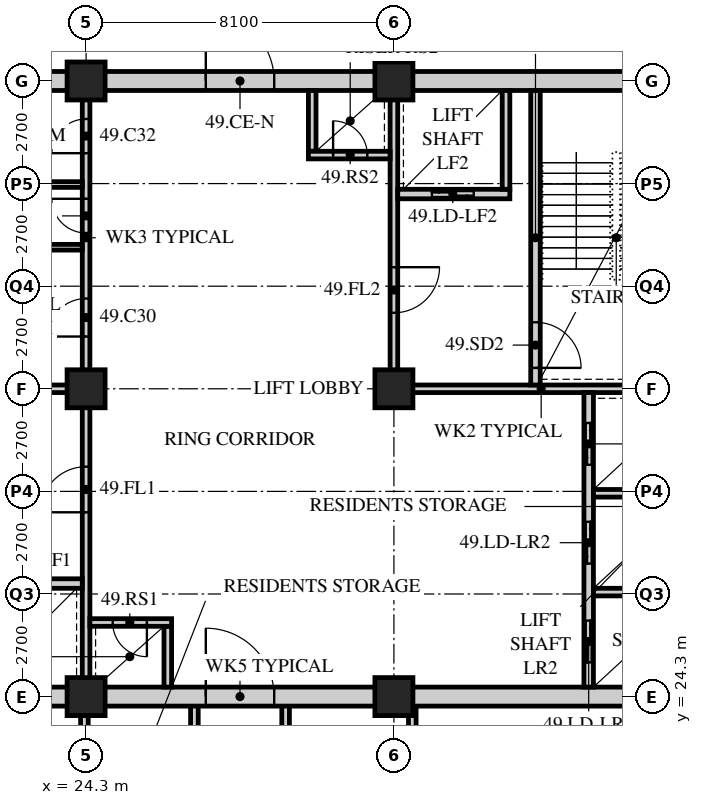
"""IFC4 building model, lengths in metres.
Left out: names, types, materials, properties, quantities, classifications, styles, units other than length and angle.
Written with IfcOpenShell. Run it as: python <this file> out.ifc"""

import sys

from ifc_helpers import new_model, si_unit, direction, frame, frame_2d, origin, origin_2d, place, context, subcontext, project, spatial, rectangle, hollow_rectangle, extrude, element, fill, save


model = new_model("IFC4")
c1 = context("Model", 3, precision=1e-05, world=origin(), true_north=direction((0.0, 1.0)))
c2 = subcontext(c1, "Body", "Model", "MODEL_VIEW")
j1 = project(units=[si_unit("LENGTHUNIT", "METRE"), si_unit("PLANEANGLEUNIT", "RADIAN")], contexts=[c1])
p1 = place(None, origin())
s1 = spatial("IfcSite", under=j1, at=p1, CompositionType="ELEMENT")
p2 = place(p1, origin())
s2 = spatial("IfcBuilding", under=s1, at=p2, CompositionType="ELEMENT")
p3 = place(p2, frame((0.0, 0.0, 192.0)))
s3 = spatial("IfcBuildingStorey", under=s2, at=p3, CompositionType="ELEMENT", Elevation=192.0)
for number, where, z_axis, x_axis in (
    (1, (24.3, 24.3, 0.0), (0.0, 0.0, 1.0), (1.0, 0.0, 0.0)),
    (2, (24.3, 32.4, 0.0), (0.0, 0.0, 1.0), (1.0, 0.0, 0.0)),
    (3, (24.3, 40.5, 0.0), (0.0, 0.0, 1.0), (1.0, 0.0, 0.0)),
    (4, (32.4, 24.3, 0.0), (0.0, 0.0, 1.0), (1.0, 0.0, 0.0)),
    (5, (32.4, 32.4, 0.0), (0.0, 0.0, 1.0), (1.0, 0.0, 0.0)),
    (6, (32.4, 40.5, 0.0), (0.0, 0.0, 1.0), (1.0, 0.0, 0.0)),
):
    element("IfcColumn", number, at=place(p3, frame(where, z_axis=z_axis, x_axis=x_axis)), inside=s3, PredefinedType="COLUMN", context=c2, shape_type="SweptSolid", body=[
        extrude(hollow_rectangle(XDim=1.0, YDim=1.0, WallThickness=0.1, at=origin_2d()), origin(), (0.0, 0.0, 1.0), 3.6),
    ])
p4 = place(p3, frame((24.256, 20.7, 0.0), z_axis=(0.0, 0.0, 1.0), x_axis=(0.0, 1.0, 0.0)))
e7 = element("IfcWall", 7, at=p4, inside=s3, PredefinedType="SOLIDWALL", context=c2, shape_type="SweptSolid", body=[
    extrude(rectangle(XDim=3.6, YDim=0.2, at=frame_2d((1.8, 0.0))), origin(), (0.0, 0.0, 1.0), 2.778),
])
for number, where, z_axis, x_axis in (
    (8, (32.883, 20.7, 0.0), (0.0, 0.0, 1.0), (0.0, 1.0, 0.0)),
    (9, (27.15, 20.7, 0.0), (0.0, 0.0, 1.0), (0.0, 1.0, 0.0)),
    (10, (29.55, 20.7, 0.0), (0.0, 0.0, 1.0), (0.0, 1.0, 0.0)),
):
    element("IfcWall", number, at=place(p3, frame(where, z_axis=z_axis, x_axis=x_axis)), inside=s3, PredefinedType="SOLIDWALL", context=c2, shape_type="SweptSolid", body=[
        extrude(rectangle(XDim=3.6, YDim=0.2, at=frame_2d((1.8, 0.0))), origin(), (0.0, 0.0, 1.0), 3.39),
    ])
p5 = place(p3, frame((15.95, 24.3, 0.0), z_axis=(0.0, 0.0, 1.0), x_axis=(1.0, 0.0, 0.0)))
e11 = element("IfcWall", 11, at=p5, inside=s3, PredefinedType="SOLIDWALL", context=c2, shape_type="SweptSolid", body=[
    extrude(rectangle(XDim=24.8, YDim=0.5, at=frame_2d((12.4, 0.0))), origin(), (0.0, 0.0, 1.0), 2.74),
])
p6 = place(p5, frame((11.5, 0.0, 0.0)))
e12 = element("IfcOpeningElement", 12, at=p6, cuts=e11, PredefinedType="OPENING", context=c2, shape_type="SweptSolid", body=[
    extrude(rectangle(XDim=1.8, YDim=2.4, at=frame_2d((0.9, 1.2))), frame((0.0, 0.26, 0.0), z_axis=(0.0, -1.0, 0.0), x_axis=(1.0, 0.0, 0.0)), (0.0, 0.0, 1.0), 0.52),
])
p7 = place(p3, frame((15.95, 40.5, 0.0), z_axis=(0.0, 0.0, 1.0), x_axis=(1.0, 0.0, 0.0)))
e13 = element("IfcWall", 13, at=p7, inside=s3, PredefinedType="SOLIDWALL", context=c2, shape_type="SweptSolid", body=[
    extrude(rectangle(XDim=24.8, YDim=0.5, at=frame_2d((12.4, 0.0))), origin(), (0.0, 0.0, 1.0), 2.74),
])
p8 = place(p7, frame((11.5, 0.0, 0.0)))
e14 = element("IfcOpeningElement", 14, at=p8, cuts=e13, PredefinedType="OPENING", context=c2, shape_type="SweptSolid", body=[
    extrude(rectangle(XDim=1.8, YDim=2.4, at=frame_2d((0.9, 1.2))), frame((0.0, 0.26, 0.0), z_axis=(0.0, -1.0, 0.0), x_axis=(1.0, 0.0, 0.0)), (0.0, 0.0, 1.0), 0.52),
])
p9 = place(p3, frame((16.45, 32.4, 0.0), z_axis=(0.0, 0.0, 1.0), x_axis=(1.0, 0.0, 0.0)))
e15 = element("IfcWall", 15, at=p9, inside=s3, PredefinedType="SOLIDWALL", context=c2, shape_type="SweptSolid", body=[
    extrude(rectangle(XDim=7.95, YDim=0.2, at=frame_2d((3.975, 0.0))), origin(), (0.0, 0.0, 1.0), 2.778),
])
p10 = place(p3, frame((24.3, 24.55, 0.0), z_axis=(0.0, 0.0, 1.0), x_axis=(0.0, 1.0, 0.0)))
e16 = element("IfcWall", 16, at=p10, inside=s3, PredefinedType="SOLIDWALL", context=c2, shape_type="SweptSolid", body=[
    extrude(rectangle(XDim=7.75, YDim=0.2, at=frame_2d((3.875, 0.0))), origin(), (0.0, 0.0, 1.0), 2.778),
])
p11 = place(p10, frame((4.6, 0.0, 0.0)))
e17 = element("IfcOpeningElement", 17, at=p11, cuts=e16, PredefinedType="OPENING", context=c2, shape_type="SweptSolid", body=[
    extrude(rectangle(XDim=1.2, YDim=2.1, at=frame_2d((0.6, 1.05))), frame((0.0, 0.11, 0.0), z_axis=(0.0, -1.0, 0.0), x_axis=(1.0, 0.0, 0.0)), (0.0, 0.0, 1.0), 0.22),
])
p12 = place(p3, frame((21.25, 27.275, 0.0), z_axis=(0.0, 0.0, 1.0), x_axis=(1.0, 0.0, 0.0)))
e18 = element("IfcWall", 18, at=p12, inside=s3, PredefinedType="SOLIDWALL", context=c2, shape_type="SweptSolid", body=[
    extrude(rectangle(XDim=2.95, YDim=0.25, at=frame_2d((1.475, 0.0))), origin(), (0.0, 0.0, 1.0), 3.39),
])
p13 = place(p12, frame((0.95, 0.0, 0.0)))
e19 = element("IfcOpeningElement", 19, at=p13, cuts=e18, PredefinedType="OPENING", context=c2, shape_type="SweptSolid", body=[
    extrude(rectangle(XDim=1.1, YDim=2.4, at=frame_2d((0.55, 1.2))), frame((0.0, 0.135, 0.0), z_axis=(0.0, -1.0, 0.0), x_axis=(1.0, 0.0, 0.0)), (0.0, 0.0, 1.0), 0.27),
])
p14 = place(p3, frame((26.45, 24.55, 0.0), z_axis=(0.0, 0.0, 1.0), x_axis=(0.0, 1.0, 0.0)))
e20 = element("IfcWall", 20, at=p14, inside=s3, PredefinedType="SOLIDWALL", context=c2, shape_type="SweptSolid", body=[
    extrude(rectangle(XDim=1.6, YDim=0.2, at=frame_2d((0.8, 0.0))), origin(), (0.0, 0.0, 1.0), 3.39),
])
p15 = place(p3, frame((24.4, 26.25, 0.0), z_axis=(0.0, 0.0, 1.0), x_axis=(1.0, 0.0, 0.0)))
e21 = element("IfcWall", 21, at=p15, inside=s3, PredefinedType="SOLIDWALL", context=c2, shape_type="SweptSolid", body=[
    extrude(rectangle(XDim=2.15, YDim=0.2, at=frame_2d((1.075, 0.0))), origin(), (0.0, 0.0, 1.0), 3.39),
])
p16 = place(p15, frame((0.6, 0.0, 0.0)))
e22 = element("IfcOpeningElement", 22, at=p16, cuts=e21, PredefinedType="OPENING", context=c2, shape_type="SweptSolid", body=[
    extrude(rectangle(XDim=0.9, YDim=2.1, at=frame_2d((0.45, 1.05))), frame((0.0, 0.11, 0.0), z_axis=(0.0, -1.0, 0.0), x_axis=(1.0, 0.0, 0.0)), (0.0, 0.0, 1.0), 0.22),
])
p17 = place(p3, frame((32.3, 32.4, 0.0), z_axis=(0.0, 0.0, 1.0), x_axis=(1.0, 0.0, 0.0)))
e23 = element("IfcWall", 23, at=p17, inside=s3, PredefinedType="SOLIDWALL", context=c2, shape_type="SweptSolid", body=[
    extrude(rectangle(XDim=7.95, YDim=0.2, at=frame_2d((3.975, 0.0))), origin(), (0.0, 0.0, 1.0), 2.778),
])
p18 = place(p3, frame((32.4, 32.5, 0.0), z_axis=(0.0, 0.0, 1.0), x_axis=(0.0, 1.0, 0.0)))
e24 = element("IfcWall", 24, at=p18, inside=s3, PredefinedType="SOLIDWALL", context=c2, shape_type="SweptSolid", body=[
    extrude(rectangle(XDim=7.75, YDim=0.2, at=frame_2d((3.875, 0.0))), origin(), (0.0, 0.0, 1.0), 2.778),
])
p19 = place(p18, frame((1.9, 0.0, 0.0)))
e25 = element("IfcOpeningElement", 25, at=p19, cuts=e24, PredefinedType="OPENING", context=c2, shape_type="SweptSolid", body=[
    extrude(rectangle(XDim=1.2, YDim=2.1, at=frame_2d((0.6, 1.05))), frame((0.0, 0.11, 0.0), z_axis=(0.0, -1.0, 0.0), x_axis=(1.0, 0.0, 0.0)), (0.0, 0.0, 1.0), 0.22),
])
p20 = place(p3, frame((37.525, 24.55, 0.0), z_axis=(0.0, 0.0, 1.0), x_axis=(0.0, 1.0, 0.0)))
e26 = element("IfcWall", 26, at=p20, inside=s3, PredefinedType="SOLIDWALL", context=c2, shape_type="SweptSolid", body=[
    extrude(rectangle(XDim=7.75, YDim=0.25, at=frame_2d((3.875, 0.0))), origin(), (0.0, 0.0, 1.0), 3.39),
])
p21 = place(p20, frame((0.65, 0.0, 0.0)))
e27 = element("IfcOpeningElement", 27, at=p21, cuts=e26, PredefinedType="OPENING", context=c2, shape_type="SweptSolid", body=[
    extrude(rectangle(XDim=1.1, YDim=2.4, at=frame_2d((0.55, 1.2))), frame((0.0, 0.135, 0.0), z_axis=(0.0, -1.0, 0.0), x_axis=(1.0, 0.0, 0.0)), (0.0, 0.0, 1.0), 0.27),
])
p22 = place(p20, frame((3.25, 0.0, 0.0)))
e28 = element("IfcOpeningElement", 28, at=p22, cuts=e26, PredefinedType="OPENING", context=c2, shape_type="SweptSolid", body=[
    extrude(rectangle(XDim=1.1, YDim=2.4, at=frame_2d((0.55, 1.2))), frame((0.0, 0.135, 0.0), z_axis=(0.0, -1.0, 0.0), x_axis=(1.0, 0.0, 0.0)), (0.0, 0.0, 1.0), 0.27),
])
p23 = place(p20, frame((5.85, 0.0, 0.0)))
e29 = element("IfcOpeningElement", 29, at=p23, cuts=e26, PredefinedType="OPENING", context=c2, shape_type="SweptSolid", body=[
    extrude(rectangle(XDim=1.1, YDim=2.4, at=frame_2d((0.55, 1.2))), frame((0.0, 0.135, 0.0), z_axis=(0.0, -1.0, 0.0), x_axis=(1.0, 0.0, 0.0)), (0.0, 0.0, 1.0), 0.27),
])
for number, where, z_axis, x_axis in (
    (30, (37.65, 27.05, 0.0), (0.0, 0.0, 1.0), (1.0, 0.0, 0.0)),
    (31, (37.65, 29.65, 0.0), (0.0, 0.0, 1.0), (1.0, 0.0, 0.0)),
):
    element("IfcWall", number, at=place(p3, frame(where, z_axis=z_axis, x_axis=x_axis)), inside=s3, PredefinedType="SOLIDWALL", context=c2, shape_type="SweptSolid", body=[
        extrude(rectangle(XDim=2.6, YDim=0.2, at=frame_2d((1.3, 0.0))), origin(), (0.0, 0.0, 1.0), 3.39),
    ])
p24 = place(p3, frame((36.125, 32.5, 0.0), z_axis=(0.0, 0.0, 1.0), x_axis=(0.0, 1.0, 0.0)))
e32 = element("IfcWall", 32, at=p24, inside=s3, PredefinedType="SOLIDWALL", context=c2, shape_type="SweptSolid", body=[
    extrude(rectangle(XDim=7.75, YDim=0.25, at=frame_2d((3.875, 0.0))), origin(), (0.0, 0.0, 1.0), 3.39),
])
p25 = place(p24, frame((0.45, 0.0, 0.0)))
e33 = element("IfcOpeningElement", 33, at=p25, cuts=e32, PredefinedType="OPENING", context=c2, shape_type="SweptSolid", body=[
    extrude(rectangle(XDim=1.2, YDim=2.1, at=frame_2d((0.6, 1.05))), frame((0.0, 0.135, 0.0), z_axis=(0.0, -1.0, 0.0), x_axis=(1.0, 0.0, 0.0)), (0.0, 0.0, 1.0), 0.27),
])
p26 = place(p3, frame((32.5, 37.525, 0.0), z_axis=(0.0, 0.0, 1.0), x_axis=(1.0, 0.0, 0.0)))
e34 = element("IfcWall", 34, at=p26, inside=s3, PredefinedType="SOLIDWALL", context=c2, shape_type="SweptSolid", body=[
    extrude(rectangle(XDim=2.95, YDim=0.25, at=frame_2d((1.475, 0.0))), origin(), (0.0, 0.0, 1.0), 3.39),
])
p27 = place(p26, frame((0.9, 0.0, 0.0)))
e35 = element("IfcOpeningElement", 35, at=p27, cuts=e34, PredefinedType="OPENING", context=c2, shape_type="SweptSolid", body=[
    extrude(rectangle(XDim=1.1, YDim=2.4, at=frame_2d((0.55, 1.2))), frame((0.0, 0.135, 0.0), z_axis=(0.0, -1.0, 0.0), x_axis=(1.0, 0.0, 0.0)), (0.0, 0.0, 1.0), 0.27),
])
p28 = place(p3, frame((35.35, 37.65, 0.0), z_axis=(0.0, 0.0, 1.0), x_axis=(0.0, 1.0, 0.0)))
e36 = element("IfcWall", 36, at=p28, inside=s3, PredefinedType="SOLIDWALL", context=c2, shape_type="SweptSolid", body=[
    extrude(rectangle(XDim=2.6, YDim=0.2, at=frame_2d((1.3, 0.0))), origin(), (0.0, 0.0, 1.0), 3.39),
])
p29 = place(p3, frame((30.25, 38.65, 0.0), z_axis=(0.0, 0.0, 1.0), x_axis=(0.0, 1.0, 0.0)))
e37 = element("IfcWall", 37, at=p29, inside=s3, PredefinedType="SOLIDWALL", context=c2, shape_type="SweptSolid", body=[
    extrude(rectangle(XDim=1.6, YDim=0.2, at=frame_2d((0.8, 0.0))), origin(), (0.0, 0.0, 1.0), 3.39),
])
p30 = place(p3, frame((30.15, 38.55, 0.0), z_axis=(0.0, 0.0, 1.0), x_axis=(1.0, 0.0, 0.0)))
e38 = element("IfcWall", 38, at=p30, inside=s3, PredefinedType="SOLIDWALL", context=c2, shape_type="SweptSolid", body=[
    extrude(rectangle(XDim=2.15, YDim=0.2, at=frame_2d((1.075, 0.0))), origin(), (0.0, 0.0, 1.0), 3.39),
])
p31 = place(p30, frame((0.65, 0.0, 0.0)))
e39 = element("IfcOpeningElement", 39, at=p31, cuts=e38, PredefinedType="OPENING", context=c2, shape_type="SweptSolid", body=[
    extrude(rectangle(XDim=0.9, YDim=2.1, at=frame_2d((0.45, 1.05))), frame((0.0, 0.11, 0.0), z_axis=(0.0, -1.0, 0.0), x_axis=(1.0, 0.0, 0.0)), (0.0, 0.0, 1.0), 0.22),
])
p32 = place(p3, frame((24.3, 32.5, 0.0), z_axis=(0.0, 0.0, 1.0), x_axis=(0.0, 1.0, 0.0)))
e40 = element("IfcWall", 40, at=p32, inside=s3, PredefinedType="PARTITIONING", context=c2, shape_type="SweptSolid", body=[
    extrude(rectangle(XDim=7.75, YDim=0.2, at=frame_2d((3.875, 0.0))), origin(), (0.0, 0.0, 1.0), 2.778),
])
p33 = place(p32, frame((1.275, 0.0, 0.0)))
e41 = element("IfcOpeningElement", 41, at=p33, cuts=e40, PredefinedType="OPENING", context=c2, shape_type="SweptSolid", body=[
    extrude(rectangle(XDim=1.0, YDim=2.1, at=frame_2d((0.5, 1.05))), frame((0.0, 0.11, 0.0), z_axis=(0.0, -1.0, 0.0), x_axis=(1.0, 0.0, 0.0)), (0.0, 0.0, 1.0), 0.22),
])
p34 = place(p32, frame((4.0, 0.0, 0.0)))
e42 = element("IfcOpeningElement", 42, at=p34, cuts=e40, PredefinedType="OPENING", context=c2, shape_type="SweptSolid", body=[
    extrude(rectangle(XDim=0.9, YDim=2.1, at=frame_2d((0.45, 1.05))), frame((0.0, 0.11, 0.0), z_axis=(0.0, -1.0, 0.0), x_axis=(1.0, 0.0, 0.0)), (0.0, 0.0, 1.0), 0.22),
])
p35 = place(p32, frame((6.1, 0.0, 0.0)))
e43 = element("IfcOpeningElement", 43, at=p35, cuts=e40, PredefinedType="OPENING", context=c2, shape_type="SweptSolid", body=[
    extrude(rectangle(XDim=0.9, YDim=2.1, at=frame_2d((0.45, 1.05))), frame((0.0, 0.11, 0.0), z_axis=(0.0, -1.0, 0.0), x_axis=(1.0, 0.0, 0.0)), (0.0, 0.0, 1.0), 0.22),
])
for number, where, z_axis, x_axis in (
    (44, (21.05, 36.125, 0.0), (0.0, 0.0, 1.0), (1.0, 0.0, 0.0)),
    (45, (21.05, 37.775, 0.0), (0.0, 0.0, 1.0), (1.0, 0.0, 0.0)),
):
    element("IfcWall", number, at=place(p3, frame(where, z_axis=z_axis, x_axis=x_axis)), inside=s3, PredefinedType="PARTITIONING", context=c2, shape_type="SweptSolid", body=[
        extrude(rectangle(XDim=3.15, YDim=0.15, at=frame_2d((1.575, 0.0))), origin(), (0.0, 0.0, 1.0), 3.39),
    ])
p36 = place(p33, origin())
e46 = element("IfcDoor", 46, at=p36, inside=s3, OperationType="SINGLE_SWING_LEFT", PredefinedType="DOOR", context=c2, shape_type="SweptSolid", body=[
    extrude(rectangle(XDim=1.0, YDim=2.1, at=frame_2d((0.5, 1.05))), frame((0.0, 0.025, 0.0), z_axis=(0.0, -1.0, 0.0), x_axis=(1.0, 0.0, 0.0)), (0.0, 0.0, 1.0), 0.05),
])
fill(e41, e46)
p37 = place(p34, origin())
e47 = element("IfcDoor", 47, at=p37, inside=s3, OperationType="SINGLE_SWING_RIGHT", PredefinedType="DOOR", context=c2, shape_type="SweptSolid", body=[
    extrude(rectangle(XDim=0.9, YDim=2.1, at=frame_2d((0.45, 1.05))), frame((0.0, 0.025, 0.0), z_axis=(0.0, -1.0, 0.0), x_axis=(1.0, 0.0, 0.0)), (0.0, 0.0, 1.0), 0.05),
])
fill(e42, e47)
p38 = place(p35, origin())
e48 = element("IfcDoor", 48, at=p38, inside=s3, OperationType="SINGLE_SWING_LEFT", PredefinedType="DOOR", context=c2, shape_type="SweptSolid", body=[
    extrude(rectangle(XDim=0.9, YDim=2.1, at=frame_2d((0.45, 1.05))), frame((0.0, 0.025, 0.0), z_axis=(0.0, -1.0, 0.0), x_axis=(1.0, 0.0, 0.0)), (0.0, 0.0, 1.0), 0.05),
])
fill(e43, e48)
p39 = place(p11, origin())
e49 = element("IfcDoor", 49, at=p39, inside=s3, OperationType="SINGLE_SWING_LEFT", PredefinedType="DOOR", context=c2, shape_type="SweptSolid", body=[
    extrude(rectangle(XDim=1.2, YDim=2.1, at=frame_2d((0.6, 1.05))), frame((0.0, 0.025, 0.0), z_axis=(0.0, -1.0, 0.0), x_axis=(1.0, 0.0, 0.0)), (0.0, 0.0, 1.0), 0.05),
])
fill(e17, e49)
p40 = place(p16, origin())
e50 = element("IfcDoor", 50, at=p40, inside=s3, OperationType="SINGLE_SWING_LEFT", PredefinedType="DOOR", context=c2, shape_type="SweptSolid", body=[
    extrude(rectangle(XDim=0.9, YDim=2.1, at=frame_2d((0.45, 1.05))), frame((0.0, 0.025, 0.0), z_axis=(0.0, -1.0, 0.0), x_axis=(1.0, 0.0, 0.0)), (0.0, 0.0, 1.0), 0.05),
])
fill(e22, e50)
p41 = place(p25, origin())
e51 = element("IfcDoor", 51, at=p41, inside=s3, OperationType="SINGLE_SWING_RIGHT", PredefinedType="DOOR", context=c2, shape_type="SweptSolid", body=[
    extrude(rectangle(XDim=1.2, YDim=2.1, at=frame_2d((0.6, 1.05))), frame((0.0, 0.025, 0.0), z_axis=(0.0, -1.0, 0.0), x_axis=(1.0, 0.0, 0.0)), (0.0, 0.0, 1.0), 0.05),
])
fill(e33, e51)
p42 = place(p19, origin())
e52 = element("IfcDoor", 52, at=p42, inside=s3, OperationType="SINGLE_SWING_LEFT", PredefinedType="DOOR", context=c2, shape_type="SweptSolid", body=[
    extrude(rectangle(XDim=1.2, YDim=2.1, at=frame_2d((0.6, 1.05))), frame((0.0, 0.025, 0.0), z_axis=(0.0, -1.0, 0.0), x_axis=(1.0, 0.0, 0.0)), (0.0, 0.0, 1.0), 0.05),
])
fill(e25, e52)
p43 = place(p31, origin())
e53 = element("IfcDoor", 53, at=p43, inside=s3, OperationType="SINGLE_SWING_LEFT", PredefinedType="DOOR", context=c2, shape_type="SweptSolid", body=[
    extrude(rectangle(XDim=0.9, YDim=2.1, at=frame_2d((0.45, 1.05))), frame((0.0, 0.025, 0.0), z_axis=(0.0, -1.0, 0.0), x_axis=(1.0, 0.0, 0.0)), (0.0, 0.0, 1.0), 0.05),
])
fill(e39, e53)
p44 = place(p21, origin())
e54 = element("IfcDoor", 54, at=p44, inside=s3, OperationType="DOUBLE_DOOR_SLIDING", PredefinedType="DOOR", context=c2, shape_type="SweptSolid", body=[
    extrude(rectangle(XDim=1.1, YDim=2.4, at=frame_2d((0.55, 1.2))), frame((0.0, 0.025, 0.0), z_axis=(0.0, -1.0, 0.0), x_axis=(1.0, 0.0, 0.0)), (0.0, 0.0, 1.0), 0.05),
])
fill(e27, e54)
p45 = place(p22, origin())
e55 = element("IfcDoor", 55, at=p45, inside=s3, OperationType="DOUBLE_DOOR_SLIDING", PredefinedType="DOOR", context=c2, shape_type="SweptSolid", body=[
    extrude(rectangle(XDim=1.1, YDim=2.4, at=frame_2d((0.55, 1.2))), frame((0.0, 0.025, 0.0), z_axis=(0.0, -1.0, 0.0), x_axis=(1.0, 0.0, 0.0)), (0.0, 0.0, 1.0), 0.05),
])
fill(e28, e55)
p46 = place(p23, origin())
e56 = element("IfcDoor", 56, at=p46, inside=s3, OperationType="DOUBLE_DOOR_SLIDING", PredefinedType="DOOR", context=c2, shape_type="SweptSolid", body=[
    extrude(rectangle(XDim=1.1, YDim=2.4, at=frame_2d((0.55, 1.2))), frame((0.0, 0.025, 0.0), z_axis=(0.0, -1.0, 0.0), x_axis=(1.0, 0.0, 0.0)), (0.0, 0.0, 1.0), 0.05),
])
fill(e29, e56)
p47 = place(p27, origin())
e57 = element("IfcDoor", 57, at=p47, inside=s3, OperationType="DOUBLE_DOOR_SLIDING", PredefinedType="DOOR", context=c2, shape_type="SweptSolid", body=[
    extrude(rectangle(XDim=1.1, YDim=2.4, at=frame_2d((0.55, 1.2))), frame((0.0, 0.025, 0.0), z_axis=(0.0, -1.0, 0.0), x_axis=(1.0, 0.0, 0.0)), (0.0, 0.0, 1.0), 0.05),
])
fill(e35, e57)
p48 = place(p6, origin())
e58 = element("IfcDoor", 58, at=p48, inside=s3, OperationType="DOUBLE_DOOR_SINGLE_SWING", PredefinedType="DOOR", context=c2, shape_type="SweptSolid", body=[
    extrude(rectangle(XDim=1.8, YDim=2.4, at=frame_2d((0.9, 1.2))), frame((0.0, 0.025, 0.0), z_axis=(0.0, -1.0, 0.0), x_axis=(1.0, 0.0, 0.0)), (0.0, 0.0, 1.0), 0.05),
])
fill(e12, e58)
p49 = place(p8, origin())
e59 = element("IfcDoor", 59, at=p49, inside=s3, OperationType="DOUBLE_DOOR_SINGLE_SWING", PredefinedType="DOOR", context=c2, shape_type="SweptSolid", body=[
    extrude(rectangle(XDim=1.8, YDim=2.4, at=frame_2d((0.9, 1.2))), frame((0.0, 0.025, 0.0), z_axis=(0.0, -1.0, 0.0), x_axis=(1.0, 0.0, 0.0)), (0.0, 0.0, 1.0), 0.05),
])
fill(e14, e59)
save(model, sys.argv[1])
